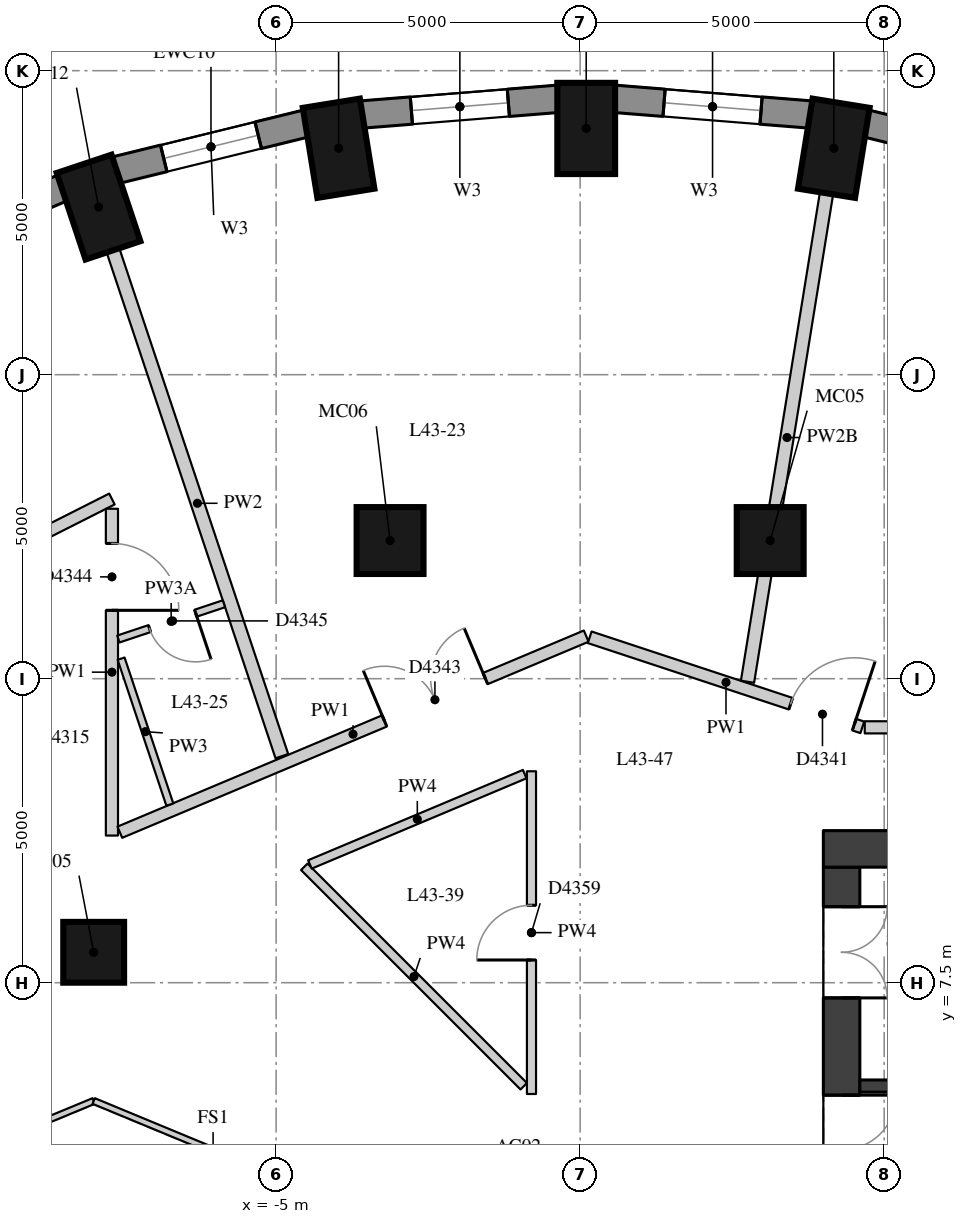
"""IFC4 building model, lengths in metres.
Left out: names, types, materials, properties, quantities, classifications, styles, units other than length and angle.
Written with IfcOpenShell. Run it as: python <this file> out.ifc"""

import sys

from ifc_helpers import new_model, si_unit, direction, frame, frame_2d, origin, origin_2d, place, context, subcontext, project, spatial, rectangle, extrude, element, fill, save


model = new_model("IFC4")
c1 = context("Model", 3, precision=1e-05, world=origin(), true_north=direction((0.0, 1.0)))
c2 = subcontext(c1, "Body", "Model", "MODEL_VIEW")
j1 = project(units=[si_unit("LENGTHUNIT", "METRE"), si_unit("PLANEANGLEUNIT", "RADIAN")], contexts=[c1])
p1 = place(None, origin())
s1 = spatial("IfcSite", under=j1, at=p1, CompositionType="ELEMENT")
p2 = place(p1, origin())
s2 = spatial("IfcBuilding", under=s1, at=p2, CompositionType="ELEMENT")
p3 = place(p2, frame((0.0, 0.0, 155.0)))
s3 = spatial("IfcBuildingStorey", under=s2, at=p3, CompositionType="ELEMENT", Elevation=155.0)
for number, where, z_axis, x_axis in (
    (1, (4.172, 21.224, 0.0), (0.0, 0.0, 1.0), (0.16, 0.987, 0.0)),
    (2, (0.1, 21.55, 0.0), (0.0, 0.0, 1.0), (0.0, 1.0, 0.0)),
    (3, (-3.972, 21.224, 0.0), (0.0, 0.0, 1.0), (-0.16, 0.987, 0.0)),
    (4, (-7.92, 20.256, 0.0), (0.0, 0.0, 1.0), (-0.317, 0.949, 0.0)),
):
    element("IfcColumn", number, at=place(p3, frame(where, z_axis=z_axis, x_axis=x_axis)), inside=s3, PredefinedType="COLUMN", context=c2, shape_type="SweptSolid", body=[
        extrude(rectangle(XDim=1.5, YDim=0.95, at=origin_2d()), origin(), (0.0, 0.0, 1.0), 3.3),
    ])
p4 = place(p3, frame((-8.0, 8.0, 0.0), z_axis=(0.0, 0.0, 1.0), x_axis=(1.0, 0.0, 0.0)))
e5 = element("IfcColumn", 5, at=p4, inside=s3, PredefinedType="COLUMN", context=c2, shape_type="SweptSolid", body=[
    extrude(rectangle(XDim=1.0, YDim=1.0, at=origin_2d()), origin(), (0.0, 0.0, 1.0), 3.3),
])
for number, where, z_axis, x_axis in (
    (6, (3.126, 14.772, 0.0), (0.0, 0.0, 1.0), (1.0, 0.0, 0.0)),
    (7, (-3.126, 14.772, 0.0), (0.0, 0.0, 1.0), (1.0, 0.0, 0.0)),
):
    element("IfcColumn", number, at=place(p3, frame(where, z_axis=z_axis, x_axis=x_axis)), inside=s3, PredefinedType="COLUMN", context=c2, shape_type="SweptSolid", body=[
        extrude(rectangle(XDim=1.1, YDim=1.1, at=origin_2d()), origin(), (0.0, 0.0, 1.0), 3.3),
    ])
p5 = place(p3, frame((7.843, 20.862, 0.0), z_axis=(0.0, 0.0, 1.0), x_axis=(-0.971237178372, 0.238114139328, 0.0)))
e8 = element("IfcWall", 8, at=p5, inside=s3, PredefinedType="SOLIDWALL", context=c2, shape_type="SweptSolid", body=[
    extrude(rectangle(XDim=3.237, YDim=0.45, at=frame_2d((1.618, 0.0))), origin(), (0.0, 0.0, 1.0), 3.02),
])
p6 = place(p5, frame((0.818, 0.0, 0.4)))
e9 = element("IfcOpeningElement", 9, at=p6, cuts=e8, PredefinedType="OPENING", context=c2, shape_type="SweptSolid", body=[
    extrude(rectangle(XDim=1.6, YDim=1.75, at=frame_2d((0.8, 0.875))), frame((0.0, 0.235, 0.0), z_axis=(0.0, -1.0, 0.0), x_axis=(1.0, 0.0, 0.0)), (0.0, 0.0, 1.0), 0.47),
])
p7 = place(p3, frame((3.801, 21.778, 0.0), z_axis=(0.0, 0.0, 1.0), x_axis=(-0.996812416891, 0.079780984773, 0.0)))
e10 = element("IfcWall", 10, at=p7, inside=s3, PredefinedType="SOLIDWALL", context=c2, shape_type="SweptSolid", body=[
    extrude(rectangle(XDim=3.256, YDim=0.45, at=frame_2d((1.628, 0.0))), origin(), (0.0, 0.0, 1.0), 3.02),
])
p8 = place(p7, frame((0.828, 0.0, 0.4)))
e11 = element("IfcOpeningElement", 11, at=p8, cuts=e10, PredefinedType="OPENING", context=c2, shape_type="SweptSolid", body=[
    extrude(rectangle(XDim=1.6, YDim=1.75, at=frame_2d((0.8, 0.875))), frame((0.0, 0.235, 0.0), z_axis=(0.0, -1.0, 0.0), x_axis=(1.0, 0.0, 0.0)), (0.0, 0.0, 1.0), 0.47),
])
p9 = place(p3, frame((-0.355, 22.038, 0.0), z_axis=(0.0, 0.0, 1.0), x_axis=(-0.996812416891, -0.079780984773, 0.0)))
e12 = element("IfcWall", 12, at=p9, inside=s3, PredefinedType="SOLIDWALL", context=c2, shape_type="SweptSolid", body=[
    extrude(rectangle(XDim=3.256, YDim=0.45, at=frame_2d((1.628, 0.0))), origin(), (0.0, 0.0, 1.0), 3.02),
])
p10 = place(p9, frame((0.828, 0.0, 0.4)))
e13 = element("IfcOpeningElement", 13, at=p10, cuts=e12, PredefinedType="OPENING", context=c2, shape_type="SweptSolid", body=[
    extrude(rectangle(XDim=1.6, YDim=1.75, at=frame_2d((0.8, 0.875))), frame((0.0, 0.235, 0.0), z_axis=(0.0, -1.0, 0.0), x_axis=(1.0, 0.0, 0.0)), (0.0, 0.0, 1.0), 0.47),
])
p11 = place(p3, frame((-4.499, 21.633, 0.0), z_axis=(0.0, 0.0, 1.0), x_axis=(-0.971232901476, -0.238131583563, 0.0)))
e14 = element("IfcWall", 14, at=p11, inside=s3, PredefinedType="SOLIDWALL", context=c2, shape_type="SweptSolid", body=[
    extrude(rectangle(XDim=3.237, YDim=0.45, at=frame_2d((1.618, 0.0))), origin(), (0.0, 0.0, 1.0), 3.02),
])
p12 = place(p11, frame((0.818, 0.0, 0.4)))
e15 = element("IfcOpeningElement", 15, at=p12, cuts=e14, PredefinedType="OPENING", context=c2, shape_type="SweptSolid", body=[
    extrude(rectangle(XDim=1.6, YDim=1.75, at=frame_2d((0.8, 0.875))), frame((0.0, 0.235, 0.0), z_axis=(0.0, -1.0, 0.0), x_axis=(1.0, 0.0, 0.0)), (0.0, 0.0, 1.0), 0.47),
])
p13 = place(p3, frame((-8.506, 20.574, 0.0), z_axis=(0.0, 0.0, 1.0), x_axis=(-0.919798725687, -0.392390499663, 0.0)))
e16 = element("IfcWall", 16, at=p13, inside=s3, PredefinedType="SOLIDWALL", context=c2, shape_type="SweptSolid", body=[
    extrude(rectangle(XDim=3.2, YDim=0.45, at=frame_2d((1.6, 0.0))), origin(), (0.0, 0.0, 1.0), 3.02),
])
p14 = place(p13, frame((0.8, 0.0, 0.4)))
e17 = element("IfcOpeningElement", 17, at=p14, cuts=e16, PredefinedType="OPENING", context=c2, shape_type="SweptSolid", body=[
    extrude(rectangle(XDim=1.6, YDim=1.75, at=frame_2d((0.8, 0.875))), frame((0.0, 0.235, 0.0), z_axis=(0.0, -1.0, 0.0), x_axis=(1.0, 0.0, 0.0)), (0.0, 0.0, 1.0), 0.47),
])
p15 = place(p3, frame((4.3, -9.4, 0.0), z_axis=(0.0, 0.0, 1.0), x_axis=(0.0, 1.0, 0.0)))
e18 = element("IfcWall", 18, at=p15, inside=s3, PredefinedType="SHEAR", context=c2, shape_type="SweptSolid", body=[
    extrude(rectangle(XDim=18.8, YDim=0.6, at=frame_2d((9.4, 0.0))), origin(), (0.0, 0.0, 1.0), 3.02),
])
p16 = place(p15, frame((0.65, 0.0, 0.0)))
e19 = element("IfcOpeningElement", 19, at=p16, cuts=e18, PredefinedType="OPENING", context=c2, shape_type="SweptSolid", body=[
    extrude(rectangle(XDim=1.5, YDim=2.1, at=frame_2d((0.75, 1.05))), frame((0.0, 0.31, 0.0), z_axis=(0.0, -1.0, 0.0), x_axis=(1.0, 0.0, 0.0)), (0.0, 0.0, 1.0), 0.62),
])
p17 = place(p15, frame((3.75, 0.0, 0.0)))
e20 = element("IfcOpeningElement", 20, at=p17, cuts=e18, PredefinedType="OPENING", context=c2, shape_type="SweptSolid", body=[
    extrude(rectangle(XDim=1.8, YDim=2.1, at=frame_2d((0.9, 1.05))), frame((0.0, 0.31, 0.0), z_axis=(0.0, -1.0, 0.0), x_axis=(1.0, 0.0, 0.0)), (0.0, 0.0, 1.0), 0.62),
])
p18 = place(p15, frame((6.25, 0.0, 0.0)))
e21 = element("IfcOpeningElement", 21, at=p18, cuts=e18, PredefinedType="OPENING", context=c2, shape_type="SweptSolid", body=[
    extrude(rectangle(XDim=1.1, YDim=2.1, at=frame_2d((0.55, 1.05))), frame((0.0, 0.31, 0.0), z_axis=(0.0, -1.0, 0.0), x_axis=(1.0, 0.0, 0.0)), (0.0, 0.0, 1.0), 0.62),
])
p19 = place(p15, frame((8.9, 0.0, 0.0)))
e22 = element("IfcOpeningElement", 22, at=p19, cuts=e18, PredefinedType="OPENING", context=c2, shape_type="SweptSolid", body=[
    extrude(rectangle(XDim=1.0, YDim=2.1, at=frame_2d((0.5, 1.05))), frame((0.0, 0.31, 0.0), z_axis=(0.0, -1.0, 0.0), x_axis=(1.0, 0.0, 0.0)), (0.0, 0.0, 1.0), 0.62),
])
p20 = place(p15, frame((11.45, 0.0, 0.0)))
e23 = element("IfcOpeningElement", 23, at=p20, cuts=e18, PredefinedType="OPENING", context=c2, shape_type="SweptSolid", body=[
    extrude(rectangle(XDim=1.1, YDim=2.1, at=frame_2d((0.55, 1.05))), frame((0.0, 0.31, 0.0), z_axis=(0.0, -1.0, 0.0), x_axis=(1.0, 0.0, 0.0)), (0.0, 0.0, 1.0), 0.62),
])
p21 = place(p15, frame((13.25, 0.0, 0.0)))
e24 = element("IfcOpeningElement", 24, at=p21, cuts=e18, PredefinedType="OPENING", context=c2, shape_type="SweptSolid", body=[
    extrude(rectangle(XDim=1.8, YDim=2.1, at=frame_2d((0.9, 1.05))), frame((0.0, 0.31, 0.0), z_axis=(0.0, -1.0, 0.0), x_axis=(1.0, 0.0, 0.0)), (0.0, 0.0, 1.0), 0.62),
])
p22 = place(p15, frame((16.65, 0.0, 0.0)))
e25 = element("IfcOpeningElement", 25, at=p22, cuts=e18, PredefinedType="OPENING", context=c2, shape_type="SweptSolid", body=[
    extrude(rectangle(XDim=1.5, YDim=2.1, at=frame_2d((0.75, 1.05))), frame((0.0, 0.31, 0.0), z_axis=(0.0, -1.0, 0.0), x_axis=(1.0, 0.0, 0.0)), (0.0, 0.0, 1.0), 0.62),
])
p23 = place(p3, frame((4.0, 9.7, 0.0), z_axis=(0.0, 0.0, 1.0), x_axis=(1.0, 0.0, 0.0)))
e26 = element("IfcWall", 26, at=p23, inside=s3, PredefinedType="SHEAR", context=c2, shape_type="SweptSolid", body=[
    extrude(rectangle(XDim=12.0, YDim=0.6, at=frame_2d((6.0, 0.0))), origin(), (0.0, 0.0, 1.0), 3.02),
])
p24 = place(p3, frame((4.6, 5.8, 0.0), z_axis=(0.0, 0.0, 1.0), x_axis=(1.0, 0.0, 0.0)))
e27 = element("IfcWall", 27, at=p24, inside=s3, PredefinedType="SHEAR", context=c2, shape_type="SweptSolid", body=[
    extrude(rectangle(XDim=10.8, YDim=0.2, at=frame_2d((5.4, 0.0))), origin(), (0.0, 0.0, 1.0), 3.02),
])
p25 = place(p24, frame((7.05, 0.0, 0.0)))
e28 = element("IfcOpeningElement", 28, at=p25, cuts=e27, PredefinedType="OPENING", context=c2, shape_type="SweptSolid", body=[
    extrude(rectangle(XDim=1.1, YDim=2.1, at=frame_2d((0.55, 1.05))), frame((0.0, 0.11, 0.0), z_axis=(0.0, -1.0, 0.0), x_axis=(1.0, 0.0, 0.0)), (0.0, 0.0, 1.0), 0.22),
])
p26 = place(p24, frame((9.05, 0.0, 0.0)))
e29 = element("IfcOpeningElement", 29, at=p26, cuts=e27, PredefinedType="OPENING", context=c2, shape_type="SweptSolid", body=[
    extrude(rectangle(XDim=1.1, YDim=2.1, at=frame_2d((0.55, 1.05))), frame((0.0, 0.11, 0.0), z_axis=(0.0, -1.0, 0.0), x_axis=(1.0, 0.0, 0.0)), (0.0, 0.0, 1.0), 0.22),
])
p27 = place(p3, frame((-10.416, 14.082, 0.0), z_axis=(0.0, 0.0, 1.0), x_axis=(0.892396808139, 0.451251522793, 0.0)))
e30 = element("IfcWall", 30, at=p27, inside=s3, PredefinedType="PARTITIONING", context=c2, shape_type="SweptSolid", body=[
    extrude(rectangle(XDim=3.044, YDim=0.2, at=frame_2d((1.522, 0.0))), origin(), (0.0, 0.0, 1.0), 3.02),
])
p28 = place(p3, frame((-7.7, 15.295, 0.0), z_axis=(0.0, 0.0, 1.0), x_axis=(0.0, -1.0, 0.0)))
e31 = element("IfcWall", 31, at=p28, inside=s3, PredefinedType="PARTITIONING", context=c2, shape_type="SweptSolid", body=[
    extrude(rectangle(XDim=5.375, YDim=0.2, at=frame_2d((2.688, 0.0))), origin(), (0.0, 0.0, 1.0), 3.02),
])
p29 = place(p28, frame((0.57, 0.0, 0.0)))
e32 = element("IfcOpeningElement", 32, at=p29, cuts=e31, PredefinedType="OPENING", context=c2, shape_type="SweptSolid", body=[
    extrude(rectangle(XDim=1.1, YDim=2.1, at=frame_2d((0.55, 1.05))), frame((0.0, 0.11, 0.0), z_axis=(0.0, -1.0, 0.0), x_axis=(1.0, 0.0, 0.0)), (0.0, 0.0, 1.0), 0.22),
])
p30 = place(p3, frame((-7.57, 9.975, 0.0), z_axis=(0.0, 0.0, 1.0), x_axis=(0.921815879705, 0.387628022624, 0.0)))
e33 = element("IfcWall", 33, at=p30, inside=s3, PredefinedType="PARTITIONING", context=c2, shape_type="SweptSolid", body=[
    extrude(rectangle(XDim=8.321, YDim=0.2, at=frame_2d((4.16, 0.0))), origin(), (0.0, 0.0, 1.0), 3.02),
])
p31 = place(p30, frame((4.721, 0.0, 0.0)))
e34 = element("IfcOpeningElement", 34, at=p31, cuts=e33, PredefinedType="OPENING", context=c2, shape_type="SweptSolid", body=[
    extrude(rectangle(XDim=1.8, YDim=2.1, at=frame_2d((0.9, 1.05))), frame((0.0, 0.11, 0.0), z_axis=(0.0, -1.0, 0.0), x_axis=(1.0, 0.0, 0.0)), (0.0, 0.0, 1.0), 0.22),
])
p32 = place(p3, frame((0.157, 13.181, 0.0), z_axis=(0.0, 0.0, 1.0), x_axis=(0.949543217684, -0.313636218811, 0.0)))
e35 = element("IfcWall", 35, at=p32, inside=s3, PredefinedType="PARTITIONING", context=c2, shape_type="SweptSolid", body=[
    extrude(rectangle(XDim=4.722, YDim=0.2, at=frame_2d((2.361, 0.0))), origin(), (0.0, 0.0, 1.0), 3.02),
])
p33 = place(p32, frame((3.482, 0.0, 0.0)))
e36 = element("IfcOpeningElement", 36, at=p33, cuts=e35, PredefinedType="OPENING", context=c2, shape_type="SweptSolid", body=[
    extrude(rectangle(XDim=1.1, YDim=2.1, at=frame_2d((0.55, 1.05))), frame((0.0, 0.11, 0.0), z_axis=(0.0, -1.0, 0.0), x_axis=(1.0, 0.0, 0.0)), (0.0, 0.0, 1.0), 0.22),
])
p34 = place(p3, frame((4.681, 11.7, 0.0), z_axis=(0.0, 0.0, 1.0), x_axis=(1.0, 0.0, 0.0)))
e37 = element("IfcWall", 37, at=p34, inside=s3, PredefinedType="PARTITIONING", context=c2, shape_type="SweptSolid", body=[
    extrude(rectangle(XDim=13.019, YDim=0.2, at=frame_2d((6.51, 0.0))), origin(), (0.0, 0.0, 1.0), 3.02),
])
p35 = place(p34, frame((4.662, 0.0, 0.0)))
e38 = element("IfcOpeningElement", 38, at=p35, cuts=e37, PredefinedType="OPENING", context=c2, shape_type="SweptSolid", body=[
    extrude(rectangle(XDim=0.9, YDim=2.1, at=frame_2d((0.45, 1.05))), frame((0.0, 0.11, 0.0), z_axis=(0.0, -1.0, 0.0), x_axis=(1.0, 0.0, 0.0)), (0.0, 0.0, 1.0), 0.22),
])
p36 = place(p34, frame((8.99, 0.0, 0.0)))
e39 = element("IfcOpeningElement", 39, at=p36, cuts=e37, PredefinedType="OPENING", context=c2, shape_type="SweptSolid", body=[
    extrude(rectangle(XDim=1.8, YDim=2.1, at=frame_2d((0.9, 1.05))), frame((0.0, 0.11, 0.0), z_axis=(0.0, -1.0, 0.0), x_axis=(1.0, 0.0, 0.0)), (0.0, 0.0, 1.0), 0.22),
])
p37 = place(p3, frame((-0.8, 10.977, 0.0), z_axis=(0.0, 0.0, 1.0), x_axis=(0.0, -1.0, 0.0)))
e40 = element("IfcWall", 40, at=p37, inside=s3, PredefinedType="PARTITIONING", context=c2, shape_type="SweptSolid", body=[
    extrude(rectangle(XDim=5.308, YDim=0.15, at=frame_2d((2.654, 0.0))), origin(), (0.0, 0.0, 1.0), 3.02),
])
p38 = place(p37, frame((2.204, 0.0, 0.0)))
e41 = element("IfcOpeningElement", 41, at=p38, cuts=e40, PredefinedType="OPENING", context=c2, shape_type="SweptSolid", body=[
    extrude(rectangle(XDim=0.9, YDim=2.1, at=frame_2d((0.45, 1.05))), frame((0.0, 0.085, 0.0), z_axis=(0.0, -1.0, 0.0), x_axis=(1.0, 0.0, 0.0)), (0.0, 0.0, 1.0), 0.17),
])
p39 = place(p3, frame((-0.927, 5.797, 0.0), z_axis=(0.0, 0.0, 1.0), x_axis=(-0.707106781187, 0.707106781187, 0.0)))
e42 = element("IfcWall", 42, at=p39, inside=s3, PredefinedType="PARTITIONING", context=c2, shape_type="SweptSolid", body=[
    extrude(rectangle(XDim=5.104, YDim=0.15, at=frame_2d((2.552, 0.0))), origin(), (0.0, 0.0, 1.0), 3.02),
])
p40 = place(p3, frame((-4.444, 9.445, 0.0), z_axis=(0.0, 0.0, 1.0), x_axis=(0.921822351054, 0.387612632788, 0.0)))
e43 = element("IfcWall", 43, at=p40, inside=s3, PredefinedType="PARTITIONING", context=c2, shape_type="SweptSolid", body=[
    extrude(rectangle(XDim=3.832, YDim=0.15, at=frame_2d((1.916, 0.0))), origin(), (0.0, 0.0, 1.0), 3.02),
])
p41 = place(p3, frame((4.052, 20.484, 0.0), z_axis=(0.0, 0.0, 1.0), x_axis=(-0.159683255106, -0.987168302793, 0.0)))
e44 = element("IfcWall", 44, at=p41, inside=s3, PredefinedType="PARTITIONING", context=c2, shape_type="SweptSolid", body=[
    extrude(rectangle(XDim=8.138, YDim=0.22, at=frame_2d((4.069, 0.0))), origin(), (0.0, 0.0, 1.0), 2.57),
])
p42 = place(p3, frame((-7.683, 19.545, 0.0), z_axis=(0.0, 0.0, 1.0), x_axis=(0.316703700313, -0.948524520615, 0.0)))
e45 = element("IfcWall", 45, at=p42, inside=s3, PredefinedType="PARTITIONING", context=c2, shape_type="SweptSolid", body=[
    extrude(rectangle(XDim=8.771, YDim=0.22, at=frame_2d((4.385, 0.0))), origin(), (0.0, 0.0, 1.0), 3.02),
])
p43 = place(p3, frame((-6.748, 10.429, 0.0), z_axis=(0.0, 0.0, 1.0), x_axis=(-0.316690754737, 0.948528842927, 0.0)))
e46 = element("IfcWall", 46, at=p43, inside=s3, PredefinedType="PARTITIONING", context=c2, shape_type="SweptSolid", body=[
    extrude(rectangle(XDim=2.531, YDim=0.12, at=frame_2d((1.266, 0.0))), origin(), (0.0, 0.0, 1.0), 3.02),
])
p44 = place(p3, frame((-7.594, 13.153, 0.0), z_axis=(0.0, 0.0, 1.0), x_axis=(0.948563158378, 0.316587957079, 0.0)))
e47 = element("IfcWall", 47, at=p44, inside=s3, PredefinedType="PARTITIONING", context=c2, shape_type="SweptSolid", body=[
    extrude(rectangle(XDim=1.83, YDim=0.12, at=frame_2d((0.915, 0.0))), origin(), (0.0, 0.0, 1.0), 2.57),
])
p45 = place(p44, frame((0.54, 0.0, 0.0)))
e48 = element("IfcOpeningElement", 48, at=p45, cuts=e47, PredefinedType="OPENING", context=c2, shape_type="SweptSolid", body=[
    extrude(rectangle(XDim=0.8, YDim=2.1, at=frame_2d((0.4, 1.05))), frame((0.0, 0.07, 0.0), z_axis=(0.0, -1.0, 0.0), x_axis=(1.0, 0.0, 0.0)), (0.0, 0.0, 1.0), 0.14),
])
for number, where, z_axis, x_axis in (
    (49, (-11.927, 3.927, 0.0), (0.0, 0.0, 1.0), (0.924, 0.383, 0.0)),
    (50, (-8.0, 5.554, 0.0), (0.0, 0.0, 1.0), (0.924, -0.383, 0.0)),
):
    element("IfcWall", number, at=place(p3, frame(where, z_axis=z_axis, x_axis=x_axis)), inside=s3, PredefinedType="PARTITIONING", context=c2, shape_type="SweptSolid", body=[
        extrude(rectangle(XDim=4.251, YDim=0.1, at=frame_2d((2.125, 0.0))), origin(), (0.0, 0.0, 1.0), 3.02),
    ])
p46 = place(p8, origin())
e51 = element("IfcWindow", 51, at=p46, inside=s3, PartitioningType="SINGLE_PANEL", PredefinedType="WINDOW", context=c2, shape_type="SweptSolid", body=[
    extrude(rectangle(XDim=1.6, YDim=1.75, at=frame_2d((0.8, 0.875))), frame((0.0, 0.035, 0.0), z_axis=(0.0, -1.0, 0.0), x_axis=(1.0, 0.0, 0.0)), (0.0, 0.0, 1.0), 0.06),
])
fill(e11, e51)
p47 = place(p10, origin())
e52 = element("IfcWindow", 52, at=p47, inside=s3, PartitioningType="SINGLE_PANEL", PredefinedType="WINDOW", context=c2, shape_type="SweptSolid", body=[
    extrude(rectangle(XDim=1.6, YDim=1.75, at=frame_2d((0.8, 0.875))), frame((0.0, 0.035, 0.0), z_axis=(0.0, -1.0, 0.0), x_axis=(1.0, 0.0, 0.0)), (0.0, 0.0, 1.0), 0.06),
])
fill(e13, e52)
p48 = place(p12, origin())
e53 = element("IfcWindow", 53, at=p48, inside=s3, PartitioningType="SINGLE_PANEL", PredefinedType="WINDOW", context=c2, shape_type="SweptSolid", body=[
    extrude(rectangle(XDim=1.6, YDim=1.75, at=frame_2d((0.8, 0.875))), frame((0.0, 0.035, 0.0), z_axis=(0.0, -1.0, 0.0), x_axis=(1.0, 0.0, 0.0)), (0.0, 0.0, 1.0), 0.06),
])
fill(e15, e53)
p49 = place(p21, origin())
e54 = element("IfcDoor", 54, at=p49, inside=s3, OperationType="DOUBLE_DOOR_SINGLE_SWING", PredefinedType="DOOR", context=c2, shape_type="SweptSolid", body=[
    extrude(rectangle(XDim=1.8, YDim=2.1, at=frame_2d((0.9, 1.05))), frame((0.0, 0.025, 0.0), z_axis=(0.0, -1.0, 0.0), x_axis=(1.0, 0.0, 0.0)), (0.0, 0.0, 1.0), 0.05),
])
fill(e24, e54)
p50 = place(p22, origin())
e55 = element("IfcDoor", 55, at=p50, inside=s3, OperationType="DOUBLE_DOOR_SINGLE_SWING", PredefinedType="DOOR", context=c2, shape_type="SweptSolid", body=[
    extrude(rectangle(XDim=1.5, YDim=2.1, at=frame_2d((0.75, 1.05))), frame((0.0, 0.025, 0.0), z_axis=(0.0, -1.0, 0.0), x_axis=(1.0, 0.0, 0.0)), (0.0, 0.0, 1.0), 0.05),
])
fill(e25, e55)
p51 = place(p33, origin())
e56 = element("IfcDoor", 56, at=p51, inside=s3, OperationType="SINGLE_SWING_RIGHT", PredefinedType="DOOR", context=c2, shape_type="SweptSolid", body=[
    extrude(rectangle(XDim=1.1, YDim=2.1, at=frame_2d((0.55, 1.05))), frame((0.0, 0.025, 0.0), z_axis=(0.0, -1.0, 0.0), x_axis=(1.0, 0.0, 0.0)), (0.0, 0.0, 1.0), 0.05),
])
fill(e36, e56)
p52 = place(p31, origin())
e57 = element("IfcDoor", 57, at=p52, inside=s3, OperationType="DOUBLE_DOOR_SINGLE_SWING", PredefinedType="DOOR", context=c2, shape_type="SweptSolid", body=[
    extrude(rectangle(XDim=1.8, YDim=2.1, at=frame_2d((0.9, 1.05))), frame((0.0, 0.025, 0.0), z_axis=(0.0, -1.0, 0.0), x_axis=(1.0, 0.0, 0.0)), (0.0, 0.0, 1.0), 0.05),
])
fill(e34, e57)
p53 = place(p29, origin())
e58 = element("IfcDoor", 58, at=p53, inside=s3, OperationType="SINGLE_SWING_RIGHT", PredefinedType="DOOR", context=c2, shape_type="SweptSolid", body=[
    extrude(rectangle(XDim=1.1, YDim=2.1, at=frame_2d((0.55, 1.05))), frame((0.0, 0.025, 0.0), z_axis=(0.0, -1.0, 0.0), x_axis=(1.0, 0.0, 0.0)), (0.0, 0.0, 1.0), 0.05),
])
fill(e32, e58)
p54 = place(p45, origin())
e59 = element("IfcDoor", 59, at=p54, inside=s3, OperationType="SINGLE_SWING_LEFT", PredefinedType="DOOR", context=c2, shape_type="SweptSolid", body=[
    extrude(rectangle(XDim=0.8, YDim=2.1, at=frame_2d((0.4, 1.05))), frame((0.0, 0.025, 0.0), z_axis=(0.0, -1.0, 0.0), x_axis=(1.0, 0.0, 0.0)), (0.0, 0.0, 1.0), 0.05),
])
fill(e48, e59)
p55 = place(p38, origin())
e60 = element("IfcDoor", 60, at=p55, inside=s3, OperationType="SINGLE_SWING_LEFT", PredefinedType="DOOR", context=c2, shape_type="SweptSolid", body=[
    extrude(rectangle(XDim=0.9, YDim=2.1, at=frame_2d((0.45, 1.05))), frame((0.0, 0.025, 0.0), z_axis=(0.0, -1.0, 0.0), x_axis=(1.0, 0.0, 0.0)), (0.0, 0.0, 1.0), 0.05),
])
fill(e41, e60)
save(model, sys.argv[1])
